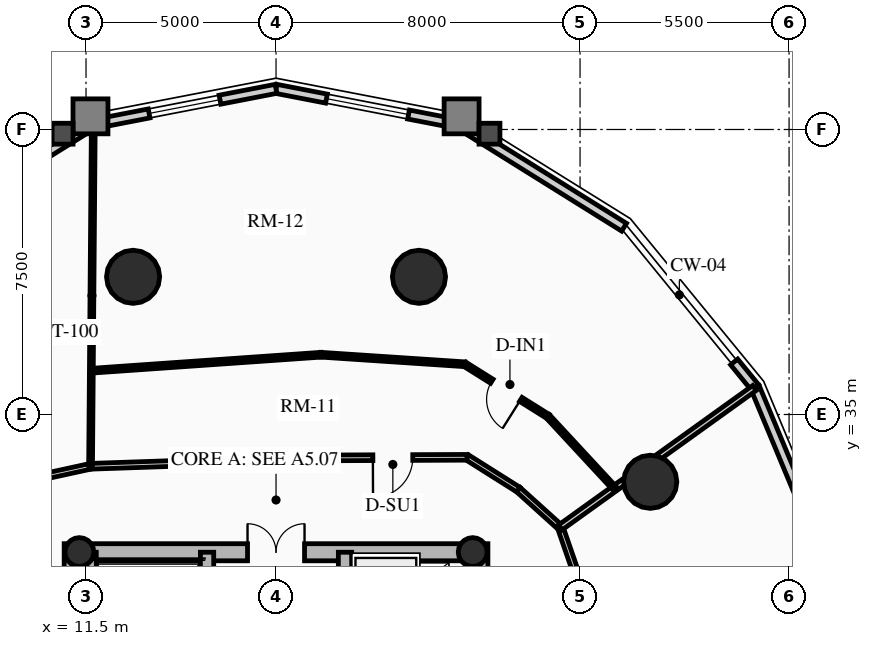
"""IFC4 building model, lengths in metres.
Left out: names, types, materials, properties, quantities, classifications, styles, units other than length and angle.
Written with IfcOpenShell. Run it as: python <this file> out.ifc"""

import sys

from ifc_helpers import new_model, si_unit, direction, frame, frame_2d, origin, origin_2d, place, context, subcontext, project, spatial, rectangle, circle, hollow_circle, extrude, source, transform, mapped, element, fill, save


model = new_model("IFC4")
c1 = context("Model", 3, precision=1e-05, world=origin(), true_north=direction((0.0, 1.0)))
c2 = subcontext(c1, "Body", "Model", "MODEL_VIEW")
j1 = project(units=[si_unit("LENGTHUNIT", "METRE"), si_unit("PLANEANGLEUNIT", "RADIAN")], contexts=[c1])
p1 = place(None, origin())
s1 = spatial("IfcSite", under=j1, at=p1, CompositionType="ELEMENT")
p2 = place(p1, origin())
s2 = spatial("IfcBuilding", under=s1, at=p2, CompositionType="ELEMENT")
p3 = place(p2, frame((0.0, 0.0, 129.16)))
s3 = spatial("IfcBuildingStorey", under=s2, at=p3, CompositionType="ELEMENT", Elevation=129.16)
for number, where, z_axis, x_axis in (
    (1, (11.15, 17.4, 0.0), (0.0, 0.0, 1.0), (0.0, 1.0, 0.0)),
    (2, (21.85, 17.4, 0.0), (0.0, 0.0, 1.0), (0.0, 1.0, 0.0)),
):
    element("IfcWall", number, at=place(p3, frame(where, z_axis=z_axis, x_axis=x_axis)), inside=s3, PredefinedType="SHEAR", context=c2, shape_type="SweptSolid", body=[
        extrude(rectangle(XDim=14.2, YDim=0.45, at=frame_2d((7.1, 0.0))), origin(), (0.0, 0.0, 1.0), 3.72),
    ])
p4 = place(p3, frame((11.15, 31.375, 0.0), z_axis=(0.0, 0.0, 1.0), x_axis=(1.0, 0.0, 0.0)))
e3 = element("IfcWall", 3, at=p4, inside=s3, PredefinedType="SHEAR", context=c2, shape_type="SweptSolid", body=[
    extrude(rectangle(XDim=10.7, YDim=0.45, at=frame_2d((5.35, 0.0))), origin(), (0.0, 0.0, 1.0), 3.72),
])
m1 = source(origin(), c2, "Body", "SweptSolid", [
    extrude(rectangle(XDim=1.5, YDim=2.02, at=frame_2d((0.75, 1.01))), frame((0.0, 0.235, 0.0), z_axis=(0.0, -1.0, 0.0), x_axis=(1.0, 0.0, 0.0)), (0.0, 0.0, 1.0), 0.47),
])
p5 = place(p4, frame((4.6, 0.0, 0.0)))
e4 = element("IfcOpeningElement", 4, at=p5, cuts=e3, PredefinedType="OPENING", context=c2, shape_type="MappedRepresentation", body=[
    mapped(m1, transform((0.0, 0.0, 0.0), x_axis=(1.0, 0.0, 0.0), y_axis=(0.0, 1.0, 0.0), z_axis=(0.0, 0.0, 1.0), scale=1.0)),
])
p6 = place(p3, frame((14.685, 17.625, 0.0), z_axis=(0.0, 0.0, 1.0), x_axis=(0.0, 1.0, 0.0)))
e5 = element("IfcWall", 5, at=p6, inside=s3, PredefinedType="SHEAR", context=c2, shape_type="SweptSolid", body=[
    extrude(rectangle(XDim=13.75, YDim=0.35, at=frame_2d((6.875, 0.0))), origin(), (0.0, 0.0, 1.0), 3.72),
])
m2 = source(origin(), c2, "Body", "SweptSolid", [
    extrude(rectangle(XDim=1.1, YDim=2.015, at=frame_2d((0.55, 1.007))), frame((0.0, 0.185, 0.0), z_axis=(0.0, -1.0, 0.0), x_axis=(1.0, 0.0, 0.0)), (0.0, 0.0, 1.0), 0.37),
])
p7 = place(p6, frame((4.875, 0.0, 0.0)))
e6 = element("IfcOpeningElement", 6, at=p7, cuts=e5, PredefinedType="OPENING", context=c2, shape_type="MappedRepresentation", body=[
    mapped(m2, transform((0.0, 0.0, 0.0), x_axis=(1.0, 0.0, 0.0), y_axis=(0.0, 1.0, 0.0), z_axis=(0.0, 0.0, 1.0), scale=1.0)),
])
p8 = place(p6, frame((0.65, 0.0, 0.0)))
e7 = element("IfcOpeningElement", 7, at=p8, cuts=e5, PredefinedType="OPENING", context=c2, shape_type="MappedRepresentation", body=[
    mapped(m2, transform((0.0, 0.0, 0.0), x_axis=(1.0, 0.0, 0.0), y_axis=(0.0, 1.0, 0.0), z_axis=(0.0, 0.0, 1.0), scale=1.0)),
])
p9 = place(p6, frame((2.65, 0.0, 0.0)))
e8 = element("IfcOpeningElement", 8, at=p9, cuts=e5, PredefinedType="OPENING", context=c2, shape_type="MappedRepresentation", body=[
    mapped(m2, transform((0.0, 0.0, 0.0), x_axis=(1.0, 0.0, 0.0), y_axis=(0.0, 1.0, 0.0), z_axis=(0.0, 0.0, 1.0), scale=1.0)),
])
m3 = source(origin(), c2, "Body", "SweptSolid", [
    extrude(rectangle(XDim=1.15, YDim=2.02, at=frame_2d((0.575, 1.01))), frame((0.0, 0.185, 0.0), z_axis=(0.0, -1.0, 0.0), x_axis=(1.0, 0.0, 0.0)), (0.0, 0.0, 1.0), 0.37),
])
p10 = place(p6, frame((7.295, 0.0, 0.0)))
e9 = element("IfcOpeningElement", 9, at=p10, cuts=e5, PredefinedType="OPENING", context=c2, shape_type="MappedRepresentation", body=[
    mapped(m3, transform((0.0, 0.0, 0.0), x_axis=(1.0, 0.0, 0.0), y_axis=(0.0, 1.0, 0.0), z_axis=(0.0, 0.0, 1.0), scale=1.0)),
])
p11 = place(p3, frame((18.315, 17.625, 0.0), z_axis=(0.0, 0.0, 1.0), x_axis=(0.0, 1.0, 0.0)))
e10 = element("IfcWall", 10, at=p11, inside=s3, PredefinedType="SHEAR", context=c2, shape_type="SweptSolid", body=[
    extrude(rectangle(XDim=13.75, YDim=0.35, at=frame_2d((6.875, 0.0))), origin(), (0.0, 0.0, 1.0), 3.72),
])
p12 = place(p11, frame((10.0, 0.0, 0.0)))
e11 = element("IfcOpeningElement", 11, at=p12, cuts=e10, PredefinedType="OPENING", context=c2, shape_type="MappedRepresentation", body=[
    mapped(m2, transform((0.0, 0.0, 0.0), x_axis=(1.0, 0.0, 0.0), y_axis=(0.0, 1.0, 0.0), z_axis=(0.0, 0.0, 1.0), scale=1.0)),
])
p13 = place(p11, frame((12.0, 0.0, 0.0)))
e12 = element("IfcOpeningElement", 12, at=p13, cuts=e10, PredefinedType="OPENING", context=c2, shape_type="MappedRepresentation", body=[
    mapped(m2, transform((0.0, 0.0, 0.0), x_axis=(1.0, 0.0, 0.0), y_axis=(0.0, 1.0, 0.0), z_axis=(0.0, 0.0, 1.0), scale=1.0)),
])
p14 = place(p11, frame((5.305, 0.0, 0.0)))
e13 = element("IfcOpeningElement", 13, at=p14, cuts=e10, PredefinedType="OPENING", context=c2, shape_type="MappedRepresentation", body=[
    mapped(m3, transform((0.0, 0.0, 0.0), x_axis=(1.0, 0.0, 0.0), y_axis=(0.0, 1.0, 0.0), z_axis=(0.0, 0.0, 1.0), scale=1.0)),
])
p15 = place(p3, frame((11.595, 24.655, 0.0), z_axis=(0.0, 0.0, 1.0), x_axis=(0.0, 1.0, 0.0)))
e14 = element("IfcWall", 14, at=p15, inside=s3, PredefinedType="SHEAR", context=c2, shape_type="SweptSolid", body=[
    extrude(rectangle(XDim=6.72, YDim=0.35, at=frame_2d((3.36, 0.0))), origin(), (0.0, 0.0, 1.0), 3.72),
])
for number, where, z_axis, x_axis in (
    (15, (11.325, 31.38, 0.0), (0.0, 0.0, 1.0), (1.0, 0.0, 0.0)),
    (16, (21.675, 31.38, 0.0), (0.0, 0.0, 1.0), (1.0, 0.0, 0.0)),
):
    element("IfcColumn", number, at=place(p3, frame(where, z_axis=z_axis, x_axis=x_axis)), inside=s3, PredefinedType="COLUMN", context=c2, shape_type="SweptSolid", body=[
        extrude(hollow_circle(Radius=0.38, WallThickness=0.032, at=origin_2d()), origin(), (0.0, 0.0, 1.0), 3.72),
    ])
for number, where, z_axis, x_axis in (
    (17, (26.347, 33.229, 0.0), (0.0, 0.0, 1.0), (1.0, 0.0, 0.0)),
    (18, (20.261, 38.623, 0.0), (0.0, 0.0, 1.0), (1.0, 0.0, 0.0)),
    (19, (12.739, 38.623, 0.0), (0.0, 0.0, 1.0), (1.0, 0.0, 0.0)),
):
    element("IfcColumn", number, at=place(p3, frame(where, z_axis=z_axis, x_axis=x_axis)), inside=s3, PredefinedType="USERDEFINED", context=c2, shape_type="SweptSolid", body=[
        extrude(circle(Radius=0.7, at=origin_2d()), origin(), (0.0, 0.0, 1.0), 3.72),
    ])
p16 = place(p3, frame((29.105, 35.709, 0.0), z_axis=(0.0, 0.0, 1.0), x_axis=(0.384344417632, -0.923189779317, 0.0)))
e20 = element("IfcWall", 20, at=p16, inside=s3, PredefinedType="SOLIDWALL", context=c2, shape_type="SweptSolid", body=[
    extrude(rectangle(XDim=5.758, YDim=0.24, at=frame_2d((2.879, 0.0))), origin(), (0.0, 0.0, 1.0), 2.949),
])
p17 = place(p3, frame((28.555, 36.383, 0.0), z_axis=(0.0, 0.0, 1.0), x_axis=(0.632702874536, -0.774394649099, 0.0)))
e21 = element("IfcWall", 21, at=p17, inside=s3, PredefinedType="SOLIDWALL", context=c2, shape_type="SweptSolid", body=[
    extrude(rectangle(XDim=0.87, YDim=0.24, at=frame_2d((0.435, 0.0))), origin(), (0.0, 0.0, 1.0), 2.949),
])
p18 = place(p3, frame((21.315, 42.637, 0.0), z_axis=(0.0, 0.0, 1.0), x_axis=(0.848520380187, -0.529162701263, 0.0)))
e22 = element("IfcWall", 22, at=p18, inside=s3, PredefinedType="SOLIDWALL", context=c2, shape_type="SweptSolid", body=[
    extrude(rectangle(XDim=5.119, YDim=0.24, at=frame_2d((2.56, 0.0))), origin(), (0.0, 0.0, 1.0), 2.949),
])
p19 = place(p3, frame((16.5, 43.57, 0.0), z_axis=(0.0, 0.0, 1.0), x_axis=(0.981723785992, -0.190311344954, 0.0)))
e23 = element("IfcWall", 23, at=p19, inside=s3, PredefinedType="SOLIDWALL", context=c2, shape_type="SweptSolid", body=[
    extrude(rectangle(XDim=4.904, YDim=0.24, at=frame_2d((2.452, 0.0))), origin(), (0.0, 0.0, 1.0), 2.949),
])
m4 = source(origin(), c2, "Body", "SweptSolid", [
    extrude(rectangle(XDim=2.2, YDim=1.35, at=frame_2d((1.1, 0.675))), frame((0.0, 0.13, 0.0), z_axis=(0.0, -1.0, 0.0), x_axis=(1.0, 0.0, 0.0)), (0.0, 0.0, 1.0), 0.26),
])
p20 = place(p19, frame((1.352, 0.0, 0.65)))
e24 = element("IfcOpeningElement", 24, at=p20, cuts=e23, PredefinedType="OPENING", context=c2, shape_type="MappedRepresentation", body=[
    mapped(m4, transform((0.0, 0.0, 0.0), x_axis=(1.0, 0.0, 0.0), y_axis=(0.0, 1.0, 0.0), z_axis=(0.0, 0.0, 1.0), scale=1.0)),
])
p21 = place(p3, frame((11.685, 42.637, 0.0), z_axis=(0.0, 0.0, 1.0), x_axis=(0.981723785992, 0.190311344954, 0.0)))
e25 = element("IfcWall", 25, at=p21, inside=s3, PredefinedType="SOLIDWALL", context=c2, shape_type="SweptSolid", body=[
    extrude(rectangle(XDim=4.904, YDim=0.24, at=frame_2d((2.452, 0.0))), origin(), (0.0, 0.0, 1.0), 2.949),
])
m5 = source(origin(), c2, "Body", "SweptSolid", [
    extrude(rectangle(XDim=1.9, YDim=1.35, at=frame_2d((0.95, 0.675))), frame((0.0, 0.13, 0.0), z_axis=(0.0, -1.0, 0.0), x_axis=(1.0, 0.0, 0.0)), (0.0, 0.0, 1.0), 0.26),
])
p22 = place(p21, frame((1.502, 0.0, 0.65)))
e26 = element("IfcOpeningElement", 26, at=p22, cuts=e25, PredefinedType="OPENING", context=c2, shape_type="MappedRepresentation", body=[
    mapped(m5, transform((0.0, 0.0, 0.0), x_axis=(1.0, 0.0, 0.0), y_axis=(0.0, 1.0, 0.0), z_axis=(0.0, 0.0, 1.0), scale=1.0)),
])
p23 = place(p3, frame((7.342, 39.928, 0.0), z_axis=(0.0, 0.0, 1.0), x_axis=(0.848520380187, 0.529162701263, 0.0)))
e27 = element("IfcWall", 27, at=p23, inside=s3, PredefinedType="SOLIDWALL", context=c2, shape_type="SweptSolid", body=[
    extrude(rectangle(XDim=5.119, YDim=0.24, at=frame_2d((2.56, 0.0))), origin(), (0.0, 0.0, 1.0), 2.949),
])
p24 = place(p3, frame((24.469, 30.614, 0.0), z_axis=(0.0, 0.0, 1.0), x_axis=(-0.327228335485, 0.944945298129, 0.0)))
e28 = element("IfcWall", 28, at=p24, inside=s3, PredefinedType="PARTITIONING", context=c2, shape_type="SweptSolid", body=[
    extrude(rectangle(XDim=1.495, YDim=0.15, at=frame_2d((0.748, 0.0))), origin(), (0.0, 0.0, 1.0), 2.995),
])
p25 = place(p3, frame((23.98, 32.027, 0.0), z_axis=(0.0, 0.0, 1.0), x_axis=(-0.742353224332, 0.670008724065, 0.0)))
e29 = element("IfcWall", 29, at=p25, inside=s3, PredefinedType="PARTITIONING", context=c2, shape_type="SweptSolid", body=[
    extrude(rectangle(XDim=1.485, YDim=0.15, at=frame_2d((0.742, 0.0))), origin(), (0.0, 0.0, 1.0), 2.995),
])
p26 = place(p3, frame((22.877, 33.022, 0.0), z_axis=(0.0, 0.0, 1.0), x_axis=(-0.845895608855, 0.533348496689, 0.0)))
e30 = element("IfcWall", 30, at=p26, inside=s3, PredefinedType="PARTITIONING", context=c2, shape_type="SweptSolid", body=[
    extrude(rectangle(XDim=1.597, YDim=0.15, at=frame_2d((0.798, 0.0))), origin(), (0.0, 0.0, 1.0), 2.995),
])
p27 = place(p3, frame((21.527, 33.873, 0.0), z_axis=(0.0, 0.0, 1.0), x_axis=(-0.999991838845, -0.004040079574, 0.0)))
e31 = element("IfcWall", 31, at=p27, inside=s3, PredefinedType="PARTITIONING", context=c2, shape_type="SweptSolid", body=[
    extrude(rectangle(XDim=3.384, YDim=0.15, at=frame_2d((1.692, 0.0))), origin(), (0.0, 0.0, 1.0), 2.995),
])
m6 = source(origin(), c2, "Body", "SweptSolid", [
    extrude(rectangle(XDim=1.05, YDim=2.015, at=frame_2d((0.525, 1.007))), frame((0.0, 0.085, 0.0), z_axis=(0.0, -1.0, 0.0), x_axis=(1.0, 0.0, 0.0)), (0.0, 0.0, 1.0), 0.17),
])
p28 = place(p27, frame((1.429, 0.0, 0.0)))
e32 = element("IfcOpeningElement", 32, at=p28, cuts=e31, PredefinedType="OPENING", context=c2, shape_type="MappedRepresentation", body=[
    mapped(m6, transform((0.0, 0.0, 0.0), x_axis=(1.0, 0.0, 0.0), y_axis=(0.0, 1.0, 0.0), z_axis=(0.0, 0.0, 1.0), scale=1.0)),
])
p29 = place(p3, frame((18.143, 33.86, 0.0), z_axis=(0.0, 0.0, 1.0), x_axis=(-0.999419208319, -0.034077060363, 0.0)))
e33 = element("IfcWall", 33, at=p29, inside=s3, PredefinedType="PARTITIONING", context=c2, shape_type="SweptSolid", body=[
    extrude(rectangle(XDim=6.527, YDim=0.15, at=frame_2d((3.263, 0.0))), origin(), (0.0, 0.0, 1.0), 2.995),
])
p30 = place(p3, frame((11.62, 33.637, 0.0), z_axis=(0.0, 0.0, 1.0), x_axis=(-0.97702579435, -0.213121085711, 0.0)))
e34 = element("IfcWall", 34, at=p30, inside=s3, PredefinedType="PARTITIONING", context=c2, shape_type="SweptSolid", body=[
    extrude(rectangle(XDim=1.935, YDim=0.15, at=frame_2d((0.967, 0.0))), origin(), (0.0, 0.0, 1.0), 2.995),
])
p31 = place(p3, frame((23.98, 32.027, 0.0), z_axis=(0.0, 0.0, 1.0), x_axis=(0.812162479031, 0.58343132214, 0.0)))
e35 = element("IfcWall", 35, at=p31, inside=s3, PredefinedType="PARTITIONING", context=c2, shape_type="SweptSolid", body=[
    extrude(rectangle(XDim=6.291, YDim=0.16, at=frame_2d((3.146, 0.0))), origin(), (0.0, 0.0, 1.0), 2.949),
])
p32 = place(p3, frame((11.62, 33.637, 0.0), z_axis=(0.0, 0.0, 1.0), x_axis=(0.007965167065, 0.999968277554, 0.0)))
e36 = element("IfcWall", 36, at=p32, inside=s3, PredefinedType="MOVABLE", context=c2, shape_type="SweptSolid", body=[
    extrude(rectangle(XDim=8.981, YDim=0.1, at=frame_2d((4.49, 0.0))), origin(), (0.0, 0.0, 1.0), 2.949),
])
p33 = place(p3, frame((25.41, 33.054, 0.0), z_axis=(0.0, 0.0, 1.0), x_axis=(-0.679733694606, 0.73345899982, 0.0)))
e37 = element("IfcWall", 37, at=p33, inside=s3, PredefinedType="PARTITIONING", context=c2, shape_type="SweptSolid", body=[
    extrude(rectangle(XDim=2.586, YDim=0.125, at=frame_2d((1.293, 0.0))), origin(), (0.0, 0.0, 1.0), 3.425),
])
p34 = place(p3, frame((23.653, 34.951, 0.0), z_axis=(0.0, 0.0, 1.0), x_axis=(-0.847306782665, 0.531103771452, 0.0)))
e38 = element("IfcWall", 38, at=p34, inside=s3, PredefinedType="PARTITIONING", context=c2, shape_type="SweptSolid", body=[
    extrude(rectangle(XDim=2.581, YDim=0.125, at=frame_2d((1.291, 0.0))), origin(), (0.0, 0.0, 1.0), 2.995),
])
m7 = source(origin(), c2, "Body", "SweptSolid", [
    extrude(rectangle(XDim=0.9, YDim=2.005, at=frame_2d((0.45, 1.002))), frame((0.0, 0.073, 0.0), z_axis=(0.0, -1.0, 0.0), x_axis=(1.0, 0.0, 0.0)), (0.0, 0.0, 1.0), 0.145),
])
p35 = place(p34, frame((0.841, 0.0, 0.0)))
e39 = element("IfcOpeningElement", 39, at=p35, cuts=e38, PredefinedType="OPENING", context=c2, shape_type="MappedRepresentation", body=[
    mapped(m7, transform((0.0, 0.0, 0.0), x_axis=(1.0, 0.0, 0.0), y_axis=(0.0, 1.0, 0.0), z_axis=(0.0, 0.0, 1.0), scale=1.0)),
])
p36 = place(p3, frame((21.466, 36.322, 0.0), z_axis=(0.0, 0.0, 1.0), x_axis=(-0.997806476515, 0.066198454847, 0.0)))
e40 = element("IfcWall", 40, at=p36, inside=s3, PredefinedType="PARTITIONING", context=c2, shape_type="SweptSolid", body=[
    extrude(rectangle(XDim=3.791, YDim=0.125, at=frame_2d((1.896, 0.0))), origin(), (0.0, 0.0, 1.0), 2.995),
])
p37 = place(p3, frame((17.683, 36.573, 0.0), z_axis=(0.0, 0.0, 1.0), x_axis=(-0.997580369038, -0.069522710754, 0.0)))
e41 = element("IfcWall", 41, at=p37, inside=s3, PredefinedType="PARTITIONING", context=c2, shape_type="SweptSolid", body=[
    extrude(rectangle(XDim=6.058, YDim=0.125, at=frame_2d((3.029, 0.0))), origin(), (0.0, 0.0, 1.0), 2.995),
])
m8 = source(origin(), c2, "Body", "SweptSolid", [
    extrude(rectangle(XDim=2.2, YDim=1.35, at=frame_2d((1.1, 0.675))), frame((0.0, 0.03, 0.0), z_axis=(0.0, -1.0, 0.0), x_axis=(1.0, 0.0, 0.0)), (0.0, 0.0, 1.0), 0.06),
])
p38 = place(p20, origin())
e42 = element("IfcWindow", 42, at=p38, inside=s3, PartitioningType="DOUBLE_PANEL_VERTICAL", PredefinedType="WINDOW", context=c2, shape_type="MappedRepresentation", body=[
    mapped(m8, transform((0.0, 0.0, 0.0), x_axis=(1.0, 0.0, 0.0), y_axis=(0.0, 1.0, 0.0), z_axis=(0.0, 0.0, 1.0), scale=1.0)),
])
fill(e24, e42)
m9 = source(origin(), c2, "Body", "SweptSolid", [
    extrude(rectangle(XDim=1.9, YDim=1.35, at=frame_2d((0.95, 0.675))), frame((0.0, 0.03, 0.0), z_axis=(0.0, -1.0, 0.0), x_axis=(1.0, 0.0, 0.0)), (0.0, 0.0, 1.0), 0.06),
])
p39 = place(p22, origin())
e43 = element("IfcWindow", 43, at=p39, inside=s3, PartitioningType="DOUBLE_PANEL_VERTICAL", PredefinedType="WINDOW", context=c2, shape_type="MappedRepresentation", body=[
    mapped(m9, transform((0.0, 0.0, 0.0), x_axis=(1.0, 0.0, 0.0), y_axis=(0.0, 1.0, 0.0), z_axis=(0.0, 0.0, 1.0), scale=1.0)),
])
fill(e26, e43)
m10 = source(origin(), c2, "Body", "SweptSolid", [
    extrude(rectangle(XDim=1.5, YDim=2.02, at=frame_2d((0.75, 1.01))), frame((0.0, 0.025, 0.0), z_axis=(0.0, -1.0, 0.0), x_axis=(1.0, 0.0, 0.0)), (0.0, 0.0, 1.0), 0.05),
])
p40 = place(p5, origin())
e44 = element("IfcDoor", 44, at=p40, inside=s3, OperationType="DOUBLE_DOOR_SINGLE_SWING", PredefinedType="DOOR", context=c2, shape_type="MappedRepresentation", body=[
    mapped(m10, transform((0.0, 0.0, 0.0), x_axis=(1.0, 0.0, 0.0), y_axis=(0.0, 1.0, 0.0), z_axis=(0.0, 0.0, 1.0), scale=1.0)),
])
fill(e4, e44)
m11 = source(origin(), c2, "Body", "SweptSolid", [
    extrude(rectangle(XDim=1.05, YDim=2.015, at=frame_2d((0.525, 1.007))), frame((0.0, 0.025, 0.0), z_axis=(0.0, -1.0, 0.0), x_axis=(1.0, 0.0, 0.0)), (0.0, 0.0, 1.0), 0.05),
])
p41 = place(p28, origin())
e45 = element("IfcDoor", 45, at=p41, inside=s3, OperationType="SINGLE_SWING_RIGHT", PredefinedType="DOOR", context=c2, shape_type="MappedRepresentation", body=[
    mapped(m11, transform((0.0, 0.0, 0.0), x_axis=(1.0, 0.0, 0.0), y_axis=(0.0, 1.0, 0.0), z_axis=(0.0, 0.0, 1.0), scale=1.0)),
])
fill(e32, e45)
m12 = source(origin(), c2, "Body", "SweptSolid", [
    extrude(rectangle(XDim=0.9, YDim=2.005, at=frame_2d((0.45, 1.002))), frame((0.0, 0.025, 0.0), z_axis=(0.0, -1.0, 0.0), x_axis=(1.0, 0.0, 0.0)), (0.0, 0.0, 1.0), 0.05),
])
p42 = place(p35, origin())
e46 = element("IfcDoor", 46, at=p42, inside=s3, OperationType="SINGLE_SWING_LEFT", PredefinedType="DOOR", context=c2, shape_type="MappedRepresentation", body=[
    mapped(m12, transform((0.0, 0.0, 0.0), x_axis=(1.0, 0.0, 0.0), y_axis=(0.0, 1.0, 0.0), z_axis=(0.0, 0.0, 1.0), scale=1.0)),
])
fill(e39, e46)
save(model, sys.argv[1])
